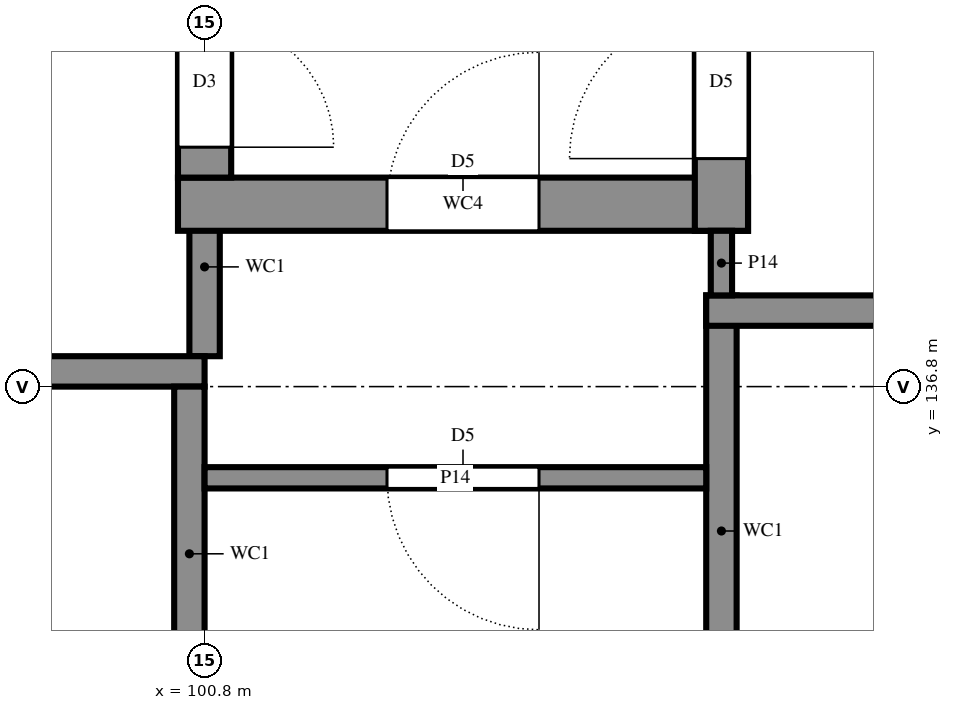
"""IFC4 building model, lengths in metres.
Left out: names, types, materials, properties, quantities, classifications, styles, units other than length and angle.
Written with IfcOpenShell. Run it as: python <this file> out.ifc"""

import sys

from ifc_helpers import new_model, si_unit, direction, frame, frame_2d, origin, place, context, subcontext, project, spatial, rectangle, extrude, element, fill, save


model = new_model("IFC4")
c1 = context("Model", 3, precision=1e-05, world=origin(), true_north=direction((0.0, 1.0)))
c2 = subcontext(c1, "Body", "Model", "MODEL_VIEW")
j1 = project(units=[si_unit("LENGTHUNIT", "METRE"), si_unit("PLANEANGLEUNIT", "RADIAN")], contexts=[c1])
p1 = place(None, origin())
s1 = spatial("IfcSite", under=j1, at=p1, CompositionType="ELEMENT")
p2 = place(p1, origin())
s2 = spatial("IfcBuilding", under=s1, at=p2, CompositionType="ELEMENT")
p3 = place(p2, frame((0.0, 0.0, 3.6)))
s3 = spatial("IfcBuildingStorey", under=s2, at=p3, CompositionType="ELEMENT", Elevation=3.6)
p4 = place(p3, frame((100.8, 137.0, 0.0), z_axis=(0.0, 0.0, 1.0), x_axis=(0.0, 1.0, 0.0)))
e1 = element("IfcWall", 1, at=p4, inside=s3, PredefinedType="SHEAR", context=c2, shape_type="SweptSolid", body=[
    extrude(rectangle(XDim=1.175, YDim=0.2, at=frame_2d((0.587, 0.0))), origin(), (0.0, 0.0, 1.0), 3.6),
])
p5 = place(p3, frame((104.2, 137.4, 0.0), z_axis=(0.0, 0.0, 1.0), x_axis=(0.0, -1.0, 0.0)))
e2 = element("IfcWall", 2, at=p5, inside=s3, PredefinedType="SHEAR", context=c2, shape_type="SweptSolid", body=[
    extrude(rectangle(XDim=3.1, YDim=0.2, at=frame_2d((1.55, 0.0))), origin(), (0.0, 0.0, 1.0), 3.6),
])
p6 = place(p3, frame((108.2, 137.3, 0.0), z_axis=(0.0, 0.0, 1.0), x_axis=(-1.0, 0.0, 0.0)))
e3 = element("IfcWall", 3, at=p6, inside=s3, PredefinedType="SHEAR", context=c2, shape_type="SweptSolid", body=[
    extrude(rectangle(XDim=4.1, YDim=0.2, at=frame_2d((2.05, 0.0))), origin(), (0.0, 0.0, 1.0), 3.6),
])
p7 = place(p3, frame((100.625, 138.0, 0.0), z_axis=(0.0, 0.0, 1.0), x_axis=(1.0, 0.0, 0.0)))
e4 = element("IfcWall", 4, at=p7, inside=s3, PredefinedType="SHEAR", context=c2, shape_type="SweptSolid", body=[
    extrude(rectangle(XDim=3.75, YDim=0.35, at=frame_2d((1.875, 0.0))), origin(), (0.0, 0.0, 1.0), 3.6),
])
p8 = place(p7, frame((1.375, 0.0, 0.0)))
e5 = element("IfcOpeningElement", 5, at=p8, cuts=e4, PredefinedType="OPENING", context=c2, shape_type="SweptSolid", body=[
    extrude(rectangle(XDim=1.0, YDim=2.1, at=frame_2d((0.5, 1.05))), frame((0.0, 0.185, 0.0), z_axis=(0.0, -1.0, 0.0), x_axis=(1.0, 0.0, 0.0)), (0.0, 0.0, 1.0), 0.37),
])
p9 = place(p3, frame((104.2, 137.825, 0.0), z_axis=(0.0, 0.0, 1.0), x_axis=(0.0, 1.0, 0.0)))
e6 = element("IfcWall", 6, at=p9, inside=s3, PredefinedType="SHEAR", context=c2, shape_type="SweptSolid", body=[
    extrude(rectangle(XDim=3.475, YDim=0.35, at=frame_2d((1.738, 0.0))), origin(), (0.0, 0.0, 1.0), 3.6),
])
p10 = place(p9, frame((0.475, 0.0, 0.0)))
e7 = element("IfcOpeningElement", 7, at=p10, cuts=e6, PredefinedType="OPENING", context=c2, shape_type="SweptSolid", body=[
    extrude(rectangle(XDim=1.0, YDim=2.1, at=frame_2d((0.5, 1.05))), frame((0.0, 0.185, 0.0), z_axis=(0.0, -1.0, 0.0), x_axis=(1.0, 0.0, 0.0)), (0.0, 0.0, 1.0), 0.37),
])
p11 = place(p3, frame((100.8, 144.175, 0.0), z_axis=(0.0, 0.0, 1.0), x_axis=(0.0, -1.0, 0.0)))
e8 = element("IfcWall", 8, at=p11, inside=s3, PredefinedType="SHEAR", context=c2, shape_type="SweptSolid", body=[
    extrude(rectangle(XDim=6.0, YDim=0.35, at=frame_2d((3.0, 0.0))), origin(), (0.0, 0.0, 1.0), 3.6),
])
p12 = place(p11, frame((4.95, 0.0, 0.0)))
e9 = element("IfcOpeningElement", 9, at=p12, cuts=e8, PredefinedType="OPENING", context=c2, shape_type="SweptSolid", body=[
    extrude(rectangle(XDim=0.85, YDim=2.1, at=frame_2d((0.425, 1.05))), frame((0.0, 0.185, 0.0), z_axis=(0.0, -1.0, 0.0), x_axis=(1.0, 0.0, 0.0)), (0.0, 0.0, 1.0), 0.37),
])
p13 = place(p3, frame((98.4, 136.9, 0.0), z_axis=(0.0, 0.0, 1.0), x_axis=(1.0, 0.0, 0.0)))
e10 = element("IfcWall", 10, at=p13, inside=s3, PredefinedType="SHEAR", context=c2, shape_type="SweptSolid", body=[
    extrude(rectangle(XDim=2.4, YDim=0.2, at=frame_2d((1.2, 0.0))), origin(), (0.0, 0.0, 1.0), 3.6),
])
p14 = place(p3, frame((100.7, 134.6, 0.0), z_axis=(0.0, 0.0, 1.0), x_axis=(0.0, 1.0, 0.0)))
e11 = element("IfcWall", 11, at=p14, inside=s3, PredefinedType="SHEAR", context=c2, shape_type="SweptSolid", body=[
    extrude(rectangle(XDim=2.2, YDim=0.2, at=frame_2d((1.1, 0.0))), origin(), (0.0, 0.0, 1.0), 3.6),
])
p15 = place(p3, frame((100.8, 136.2, 0.0), z_axis=(0.0, 0.0, 1.0), x_axis=(1.0, 0.0, 0.0)))
e12 = element("IfcWall", 12, at=p15, inside=s3, PredefinedType="PARTITIONING", context=c2, shape_type="SweptSolid", body=[
    extrude(rectangle(XDim=3.3, YDim=0.14, at=frame_2d((1.65, 0.0))), origin(), (0.0, 0.0, 1.0), 3.42),
])
p16 = place(p15, frame((1.2, 0.0, 0.0)))
e13 = element("IfcOpeningElement", 13, at=p16, cuts=e12, PredefinedType="OPENING", context=c2, shape_type="SweptSolid", body=[
    extrude(rectangle(XDim=1.0, YDim=2.1, at=frame_2d((0.5, 1.05))), frame((0.0, 0.08, 0.0), z_axis=(0.0, -1.0, 0.0), x_axis=(1.0, 0.0, 0.0)), (0.0, 0.0, 1.0), 0.16),
])
p17 = place(p3, frame((104.2, 137.4, 0.0), z_axis=(0.0, 0.0, 1.0), x_axis=(0.0, 1.0, 0.0)))
e14 = element("IfcWall", 14, at=p17, inside=s3, PredefinedType="PARTITIONING", context=c2, shape_type="SweptSolid", body=[
    extrude(rectangle(XDim=0.425, YDim=0.14, at=frame_2d((0.212, 0.0))), origin(), (0.0, 0.0, 1.0), 3.42),
])
p18 = place(p16, frame((1.0, 0.0, 0.0), z_axis=(0.0, 0.0, 1.0), x_axis=(-1.0, 0.0, 0.0)))
e15 = element("IfcDoor", 15, at=p18, inside=s3, OperationType="SINGLE_SWING_RIGHT", PredefinedType="DOOR", context=c2, shape_type="SweptSolid", body=[
    extrude(rectangle(XDim=1.0, YDim=2.1, at=frame_2d((0.5, 1.05))), frame((0.0, 0.025, 0.0), z_axis=(0.0, -1.0, 0.0), x_axis=(1.0, 0.0, 0.0)), (0.0, 0.0, 1.0), 0.05),
])
fill(e13, e15)
p19 = place(p8, origin())
e16 = element("IfcDoor", 16, at=p19, inside=s3, OperationType="SINGLE_SWING_LEFT", PredefinedType="DOOR", context=c2, shape_type="SweptSolid", body=[
    extrude(rectangle(XDim=1.0, YDim=2.1, at=frame_2d((0.5, 1.05))), frame((0.0, 0.025, 0.0), z_axis=(0.0, -1.0, 0.0), x_axis=(1.0, 0.0, 0.0)), (0.0, 0.0, 1.0), 0.05),
])
fill(e5, e16)
p20 = place(p12, origin())
e17 = element("IfcDoor", 17, at=p20, inside=s3, OperationType="SINGLE_SWING_LEFT", PredefinedType="DOOR", context=c2, shape_type="SweptSolid", body=[
    extrude(rectangle(XDim=0.85, YDim=2.1, at=frame_2d((0.425, 1.05))), frame((0.0, 0.025, 0.0), z_axis=(0.0, -1.0, 0.0), x_axis=(1.0, 0.0, 0.0)), (0.0, 0.0, 1.0), 0.05),
])
fill(e9, e17)
p21 = place(p10, origin())
e18 = element("IfcDoor", 18, at=p21, inside=s3, OperationType="SINGLE_SWING_RIGHT", PredefinedType="DOOR", context=c2, shape_type="SweptSolid", body=[
    extrude(rectangle(XDim=1.0, YDim=2.1, at=frame_2d((0.5, 1.05))), frame((0.0, 0.025, 0.0), z_axis=(0.0, -1.0, 0.0), x_axis=(1.0, 0.0, 0.0)), (0.0, 0.0, 1.0), 0.05),
])
fill(e7, e18)
save(model, sys.argv[1])
